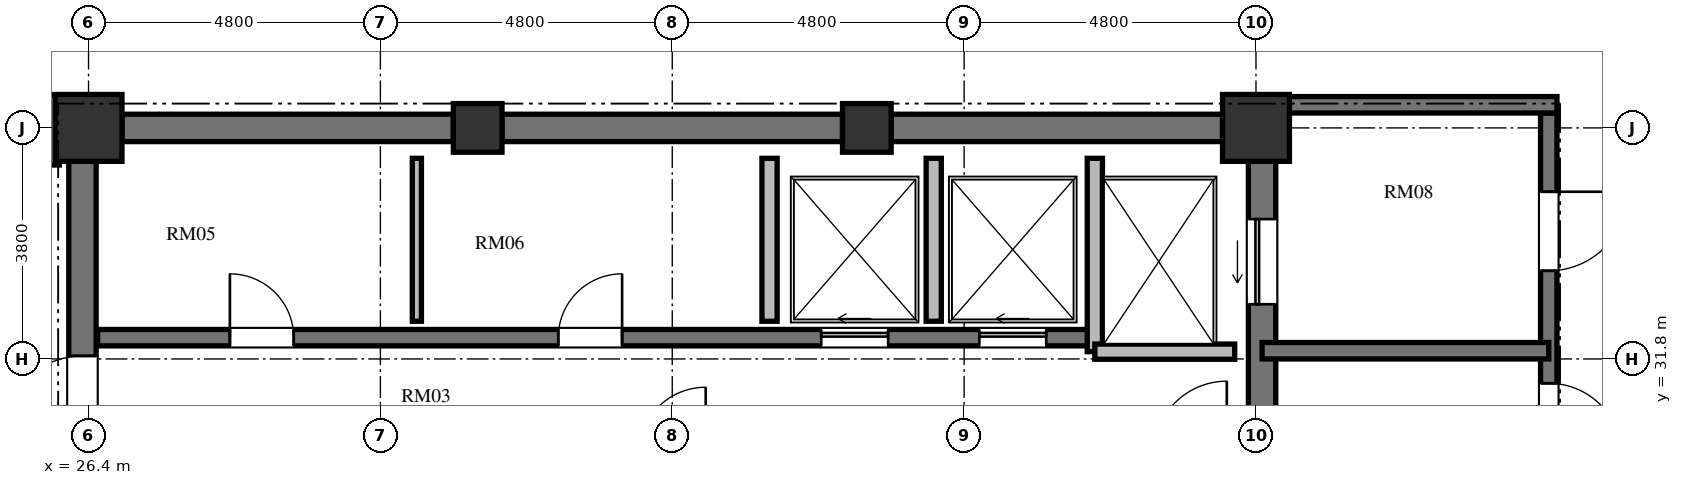
"""IFC4 building model, lengths in metres.
Left out: names, types, materials, properties, quantities, classifications, styles, units other than length and angle.
Written with IfcOpenShell. Run it as: python <this file> out.ifc"""

import sys

from ifc_helpers import new_model, si_unit, direction, frame, frame_2d, origin, origin_2d, place, context, subcontext, project, spatial, rectangle, extrude, element, fill, save


model = new_model("IFC4")
c1 = context("Model", 3, precision=1e-05, world=origin(), true_north=direction((0.0, 1.0)))
c2 = subcontext(c1, "Body", "Model", "MODEL_VIEW")
j1 = project(units=[si_unit("LENGTHUNIT", "METRE"), si_unit("PLANEANGLEUNIT", "RADIAN")], contexts=[c1])
p1 = place(None, origin())
s1 = spatial("IfcSite", under=j1, at=p1, CompositionType="ELEMENT")
p2 = place(p1, origin())
s2 = spatial("IfcBuilding", under=s1, at=p2, CompositionType="ELEMENT")
p3 = place(p2, frame((0.0, 0.0, 251.376)))
s3 = spatial("IfcBuildingStorey", under=s2, at=p3, CompositionType="ELEMENT", Elevation=251.376)
p4 = place(p3, frame((45.6, 35.6, 0.0), z_axis=(0.0, 0.0, 1.0), x_axis=(1.0, 0.0, 0.0)))
e1 = element("IfcColumn", 1, at=p4, inside=s3, PredefinedType="COLUMN", context=c2, shape_type="SweptSolid", body=[
    extrude(rectangle(XDim=1.1, YDim=1.1, at=origin_2d()), origin(), (0.0, 0.0, 1.0), 3.648),
])
for number, where, z_axis, x_axis in (
    (2, (39.2, 35.6, 0.0), (0.0, 0.0, 1.0), (1.0, 0.0, 0.0)),
    (3, (32.8, 35.6, 0.0), (0.0, 0.0, 1.0), (1.0, 0.0, 0.0)),
):
    element("IfcColumn", number, at=place(p3, frame(where, z_axis=z_axis, x_axis=x_axis)), inside=s3, PredefinedType="COLUMN", context=c2, shape_type="SweptSolid", body=[
        extrude(rectangle(XDim=0.8, YDim=0.8, at=origin_2d()), origin(), (0.0, 0.0, 1.0), 3.648),
    ])
p5 = place(p3, frame((26.4, 35.6, 0.0), z_axis=(0.0, 0.0, 1.0), x_axis=(1.0, 0.0, 0.0)))
e4 = element("IfcColumn", 4, at=p5, inside=s3, PredefinedType="COLUMN", context=c2, shape_type="SweptSolid", body=[
    extrude(rectangle(XDim=1.1, YDim=1.1, at=origin_2d()), origin(), (0.0, 0.0, 1.0), 3.648),
])
p6 = place(p3, frame((26.3, 20.95, 0.0), z_axis=(0.0, 0.0, 1.0), x_axis=(0.0, 1.0, 0.0)))
e5 = element("IfcWall", 5, at=p6, inside=s3, PredefinedType="SHEAR", context=c2, shape_type="SweptSolid", body=[
    extrude(rectangle(XDim=14.1, YDim=0.45, at=frame_2d((7.05, 0.0))), origin(), (0.0, 0.0, 1.0), 3.648),
])
p7 = place(p6, frame((6.5, 0.0, 0.0)))
e6 = element("IfcOpeningElement", 6, at=p7, cuts=e5, PredefinedType="OPENING", context=c2, shape_type="SweptSolid", body=[
    extrude(rectangle(XDim=1.2, YDim=2.15, at=frame_2d((0.6, 1.075))), frame((0.0, 0.235, 0.0), z_axis=(0.0, -1.0, 0.0), x_axis=(1.0, 0.0, 0.0)), (0.0, 0.0, 1.0), 0.47),
])
p8 = place(p6, frame((9.6, 0.0, 0.0)))
e7 = element("IfcOpeningElement", 7, at=p8, cuts=e5, PredefinedType="OPENING", context=c2, shape_type="SweptSolid", body=[
    extrude(rectangle(XDim=1.3, YDim=2.2, at=frame_2d((0.65, 1.1))), frame((0.0, 0.235, 0.0), z_axis=(0.0, -1.0, 0.0), x_axis=(1.0, 0.0, 0.0)), (0.0, 0.0, 1.0), 0.47),
])
p9 = place(p6, frame((3.26, 0.0, 0.0)))
e8 = element("IfcOpeningElement", 8, at=p9, cuts=e5, PredefinedType="OPENING", context=c2, shape_type="SweptSolid", body=[
    extrude(rectangle(XDim=1.3, YDim=2.2, at=frame_2d((0.65, 1.1))), frame((0.0, 0.235, 0.0), z_axis=(0.0, -1.0, 0.0), x_axis=(1.0, 0.0, 0.0)), (0.0, 0.0, 1.0), 0.47),
])
p10 = place(p3, frame((45.7, 20.95, 0.0), z_axis=(0.0, 0.0, 1.0), x_axis=(0.0, 1.0, 0.0)))
e9 = element("IfcWall", 9, at=p10, inside=s3, PredefinedType="SHEAR", context=c2, shape_type="SweptSolid", body=[
    extrude(rectangle(XDim=14.1, YDim=0.45, at=frame_2d((7.05, 0.0))), origin(), (0.0, 0.0, 1.0), 3.648),
])
p11 = place(p10, frame((11.75, 0.0, 0.0)))
e10 = element("IfcOpeningElement", 10, at=p11, cuts=e9, PredefinedType="OPENING", context=c2, shape_type="SweptSolid", body=[
    extrude(rectangle(XDim=1.4, YDim=2.3, at=frame_2d((0.7, 1.15))), frame((0.0, 0.235, 0.0), z_axis=(0.0, -1.0, 0.0), x_axis=(1.0, 0.0, 0.0)), (0.0, 0.0, 1.0), 0.47),
])
p12 = place(p10, frame((0.95, 0.0, 0.0)))
e11 = element("IfcOpeningElement", 11, at=p12, cuts=e9, PredefinedType="OPENING", context=c2, shape_type="SweptSolid", body=[
    extrude(rectangle(XDim=1.4, YDim=2.3, at=frame_2d((0.7, 1.15))), frame((0.0, 0.235, 0.0), z_axis=(0.0, -1.0, 0.0), x_axis=(1.0, 0.0, 0.0)), (0.0, 0.0, 1.0), 0.47),
])
p13 = place(p3, frame((26.95, 35.6, 0.0), z_axis=(0.0, 0.0, 1.0), x_axis=(1.0, 0.0, 0.0)))
e12 = element("IfcWall", 12, at=p13, inside=s3, PredefinedType="SHEAR", context=c2, shape_type="SweptSolid", body=[
    extrude(rectangle(XDim=5.45, YDim=0.45, at=frame_2d((2.725, 0.0))), origin(), (0.0, 0.0, 1.0), 3.648),
])
p14 = place(p3, frame((33.2, 35.6, 0.0), z_axis=(0.0, 0.0, 1.0), x_axis=(1.0, 0.0, 0.0)))
e13 = element("IfcWall", 13, at=p14, inside=s3, PredefinedType="SHEAR", context=c2, shape_type="SweptSolid", body=[
    extrude(rectangle(XDim=5.6, YDim=0.45, at=frame_2d((2.8, 0.0))), origin(), (0.0, 0.0, 1.0), 3.648),
])
p15 = place(p3, frame((39.6, 35.6, 0.0), z_axis=(0.0, 0.0, 1.0), x_axis=(1.0, 0.0, 0.0)))
e14 = element("IfcWall", 14, at=p15, inside=s3, PredefinedType="SHEAR", context=c2, shape_type="SweptSolid", body=[
    extrude(rectangle(XDim=5.45, YDim=0.45, at=frame_2d((2.725, 0.0))), origin(), (0.0, 0.0, 1.0), 3.648),
])
p16 = place(p3, frame((26.55, 32.15, 0.0), z_axis=(0.0, 0.0, 1.0), x_axis=(1.0, 0.0, 0.0)))
e15 = element("IfcWall", 15, at=p16, inside=s3, PredefinedType="SHEAR", context=c2, shape_type="SweptSolid", body=[
    extrude(rectangle(XDim=16.4, YDim=0.27, at=frame_2d((8.2, 0.0))), origin(), (0.0, 0.0, 1.0), 3.648),
])
p17 = place(p16, frame((2.175, 0.0, 0.0)))
e16 = element("IfcOpeningElement", 16, at=p17, cuts=e15, PredefinedType="OPENING", context=c2, shape_type="SweptSolid", body=[
    extrude(rectangle(XDim=1.05, YDim=2.15, at=frame_2d((0.525, 1.075))), frame((0.0, 0.145, 0.0), z_axis=(0.0, -1.0, 0.0), x_axis=(1.0, 0.0, 0.0)), (0.0, 0.0, 1.0), 0.29),
])
p18 = place(p16, frame((7.575, 0.0, 0.0)))
e17 = element("IfcOpeningElement", 17, at=p18, cuts=e15, PredefinedType="OPENING", context=c2, shape_type="SweptSolid", body=[
    extrude(rectangle(XDim=1.05, YDim=2.15, at=frame_2d((0.525, 1.075))), frame((0.0, 0.145, 0.0), z_axis=(0.0, -1.0, 0.0), x_axis=(1.0, 0.0, 0.0)), (0.0, 0.0, 1.0), 0.29),
])
p19 = place(p16, frame((11.9, 0.0, 0.0)))
e18 = element("IfcOpeningElement", 18, at=p19, cuts=e15, PredefinedType="OPENING", context=c2, shape_type="SweptSolid", body=[
    extrude(rectangle(XDim=1.1, YDim=2.2, at=frame_2d((0.55, 1.1))), frame((0.0, 0.145, 0.0), z_axis=(0.0, -1.0, 0.0), x_axis=(1.0, 0.0, 0.0)), (0.0, 0.0, 1.0), 0.29),
])
p20 = place(p16, frame((14.5, 0.0, 0.0)))
e19 = element("IfcOpeningElement", 19, at=p20, cuts=e15, PredefinedType="OPENING", context=c2, shape_type="SweptSolid", body=[
    extrude(rectangle(XDim=1.1, YDim=2.2, at=frame_2d((0.55, 1.1))), frame((0.0, 0.145, 0.0), z_axis=(0.0, -1.0, 0.0), x_axis=(1.0, 0.0, 0.0)), (0.0, 0.0, 1.0), 0.29),
])
p21 = place(p3, frame((42.95, 31.92, 0.0), z_axis=(0.0, 0.0, 1.0), x_axis=(0.0, 1.0, 0.0)))
e20 = element("IfcWall", 20, at=p21, inside=s3, PredefinedType="SOLIDWALL", context=c2, shape_type="SweptSolid", body=[
    extrude(rectangle(XDim=3.18, YDim=0.25, at=frame_2d((1.59, 0.0))), origin(), (0.0, 0.0, 1.0), 3.448),
])
p22 = place(p3, frame((42.95, 31.92, 0.0), z_axis=(0.0, 0.0, 1.0), x_axis=(1.0, 0.0, 0.0)))
e21 = element("IfcWall", 21, at=p22, inside=s3, PredefinedType="SOLIDWALL", context=c2, shape_type="SweptSolid", body=[
    extrude(rectangle(XDim=2.3, YDim=0.25, at=frame_2d((1.15, 0.0))), origin(), (0.0, 0.0, 1.0), 3.448),
])
for number, where, z_axis, x_axis in (
    (22, (37.6, 32.42, 0.0), (0.0, 0.0, 1.0), (0.0, 1.0, 0.0)),
    (23, (40.3, 32.42, 0.0), (0.0, 0.0, 1.0), (0.0, 1.0, 0.0)),
):
    element("IfcWall", number, at=place(p3, frame(where, z_axis=z_axis, x_axis=x_axis)), inside=s3, PredefinedType="SOLIDWALL", context=c2, shape_type="SweptSolid", body=[
        extrude(rectangle(XDim=2.68, YDim=0.25, at=frame_2d((1.34, 0.0))), origin(), (0.0, 0.0, 1.0), 3.448),
    ])
p23 = place(p3, frame((31.8, 32.42, 0.0), z_axis=(0.0, 0.0, 1.0), x_axis=(0.0, 1.0, 0.0)))
e24 = element("IfcWall", 24, at=p23, inside=s3, PredefinedType="PARTITIONING", context=c2, shape_type="SweptSolid", body=[
    extrude(rectangle(XDim=2.68, YDim=0.15, at=frame_2d((1.34, 0.0))), origin(), (0.0, 0.0, 1.0), 3.448),
])
p24 = place(p3, frame((50.415, 35.845, 0.0), z_axis=(0.0, 0.0, 1.0), x_axis=(0.0, -1.0, 0.0)))
e25 = element("IfcWall", 25, at=p24, inside=s3, PredefinedType="SHEAR", context=c2, shape_type="SweptSolid", body=[
    extrude(rectangle(XDim=15.825, YDim=0.27, at=frame_2d((7.913, 0.0))), origin(), (0.0, 0.0, 1.0), 3.648),
])
p25 = place(p24, frame((4.445, 0.0, 0.0)))
e26 = element("IfcOpeningElement", 26, at=p25, cuts=e25, PredefinedType="OPENING", context=c2, shape_type="SweptSolid", body=[
    extrude(rectangle(XDim=1.2, YDim=2.15, at=frame_2d((0.6, 1.075))), frame((0.0, 0.145, 0.0), z_axis=(0.0, -1.0, 0.0), x_axis=(1.0, 0.0, 0.0)), (0.0, 0.0, 1.0), 0.29),
])
p26 = place(p24, frame((1.295, 0.0, 0.0)))
e27 = element("IfcOpeningElement", 27, at=p26, cuts=e25, PredefinedType="OPENING", context=c2, shape_type="SweptSolid", body=[
    extrude(rectangle(XDim=1.3, YDim=2.2, at=frame_2d((0.65, 1.1))), frame((0.0, 0.145, 0.0), z_axis=(0.0, -1.0, 0.0), x_axis=(1.0, 0.0, 0.0)), (0.0, 0.0, 1.0), 0.29),
])
p27 = place(p24, frame((13.095, 0.0, 0.0)))
e28 = element("IfcOpeningElement", 28, at=p27, cuts=e25, PredefinedType="OPENING", context=c2, shape_type="SweptSolid", body=[
    extrude(rectangle(XDim=1.3, YDim=2.2, at=frame_2d((0.65, 1.1))), frame((0.0, 0.145, 0.0), z_axis=(0.0, -1.0, 0.0), x_axis=(1.0, 0.0, 0.0)), (0.0, 0.0, 1.0), 0.29),
])
p28 = place(p3, frame((45.925, 35.98, 0.0), z_axis=(0.0, 0.0, 1.0), x_axis=(1.0, 0.0, 0.0)))
e29 = element("IfcWall", 29, at=p28, inside=s3, PredefinedType="SHEAR", context=c2, shape_type="SweptSolid", body=[
    extrude(rectangle(XDim=4.625, YDim=0.27, at=frame_2d((2.312, 0.0))), origin(), (0.0, 0.0, 1.0), 3.648),
])
p29 = place(p3, frame((45.7, 31.935, 0.0), z_axis=(0.0, 0.0, 1.0), x_axis=(1.0, 0.0, 0.0)))
e30 = element("IfcWall", 30, at=p29, inside=s3, PredefinedType="SHEAR", context=c2, shape_type="SweptSolid", body=[
    extrude(rectangle(XDim=4.715, YDim=0.27, at=frame_2d((2.357, 0.0))), origin(), (0.0, 0.0, 1.0), 3.648),
])
p30 = place(p3, frame((23.294, 36.422, 0.0), z_axis=(0.0, 0.0, 1.0), x_axis=(0.945493277461, 0.325641616316, 0.0)))
e31 = element("IfcWall", 31, at=p30, inside=s3, PredefinedType="PARTITIONING", context=c2, shape_type="SweptSolid", body=[
    extrude(rectangle(XDim=5.562, YDim=0.18, at=frame_2d((2.781, 0.0))), origin(), (0.0, 0.0, 1.0), 3.073),
])
p31 = place(p3, frame((25.83, 36.14, 0.0), z_axis=(0.0, 0.0, 1.0), x_axis=(0.0, -1.0, 0.0)))
e32 = element("IfcWall", 32, at=p31, inside=s3, PredefinedType="PARTITIONING", context=c2, shape_type="SweptSolid", body=[
    extrude(rectangle(XDim=1.15, YDim=0.18, at=frame_2d((0.575, 0.0))), origin(), (0.0, 0.0, 1.0), 3.448),
])
p32 = place(p8, origin())
e33 = element("IfcDoor", 33, at=p32, inside=s3, OperationType="SINGLE_SWING_LEFT", PredefinedType="DOOR", context=c2, shape_type="SweptSolid", body=[
    extrude(rectangle(XDim=1.3, YDim=2.2, at=frame_2d((0.65, 1.1))), frame((0.0, 0.025, 0.0), z_axis=(0.0, -1.0, 0.0), x_axis=(1.0, 0.0, 0.0)), (0.0, 0.0, 1.0), 0.05),
])
fill(e7, e33)
p33 = place(p17, origin())
e34 = element("IfcDoor", 34, at=p33, inside=s3, OperationType="SINGLE_SWING_LEFT", PredefinedType="DOOR", context=c2, shape_type="SweptSolid", body=[
    extrude(rectangle(XDim=1.05, YDim=2.15, at=frame_2d((0.525, 1.075))), frame((0.0, 0.025, 0.0), z_axis=(0.0, -1.0, 0.0), x_axis=(1.0, 0.0, 0.0)), (0.0, 0.0, 1.0), 0.05),
])
fill(e16, e34)
p34 = place(p18, origin())
e35 = element("IfcDoor", 35, at=p34, inside=s3, OperationType="SINGLE_SWING_RIGHT", PredefinedType="DOOR", context=c2, shape_type="SweptSolid", body=[
    extrude(rectangle(XDim=1.05, YDim=2.15, at=frame_2d((0.525, 1.075))), frame((0.0, 0.025, 0.0), z_axis=(0.0, -1.0, 0.0), x_axis=(1.0, 0.0, 0.0)), (0.0, 0.0, 1.0), 0.05),
])
fill(e17, e35)
p35 = place(p19, origin())
e36 = element("IfcDoor", 36, at=p35, inside=s3, OperationType="SLIDING_TO_LEFT", PredefinedType="DOOR", context=c2, shape_type="SweptSolid", body=[
    extrude(rectangle(XDim=1.1, YDim=2.2, at=frame_2d((0.55, 1.1))), frame((0.0, 0.025, 0.0), z_axis=(0.0, -1.0, 0.0), x_axis=(1.0, 0.0, 0.0)), (0.0, 0.0, 1.0), 0.05),
])
fill(e18, e36)
p36 = place(p20, origin())
e37 = element("IfcDoor", 37, at=p36, inside=s3, OperationType="SLIDING_TO_LEFT", PredefinedType="DOOR", context=c2, shape_type="SweptSolid", body=[
    extrude(rectangle(XDim=1.1, YDim=2.2, at=frame_2d((0.55, 1.1))), frame((0.0, 0.025, 0.0), z_axis=(0.0, -1.0, 0.0), x_axis=(1.0, 0.0, 0.0)), (0.0, 0.0, 1.0), 0.05),
])
fill(e19, e37)
p37 = place(p11, origin())
e38 = element("IfcDoor", 38, at=p37, inside=s3, OperationType="SLIDING_TO_LEFT", PredefinedType="DOOR", context=c2, shape_type="SweptSolid", body=[
    extrude(rectangle(XDim=1.4, YDim=2.3, at=frame_2d((0.7, 1.15))), frame((0.0, 0.025, 0.0), z_axis=(0.0, -1.0, 0.0), x_axis=(1.0, 0.0, 0.0)), (0.0, 0.0, 1.0), 0.05),
])
fill(e10, e38)
p38 = place(p25, origin())
e39 = element("IfcDoor", 39, at=p38, inside=s3, OperationType="SINGLE_SWING_RIGHT", PredefinedType="DOOR", context=c2, shape_type="SweptSolid", body=[
    extrude(rectangle(XDim=1.2, YDim=2.15, at=frame_2d((0.6, 1.075))), frame((0.0, 0.025, 0.0), z_axis=(0.0, -1.0, 0.0), x_axis=(1.0, 0.0, 0.0)), (0.0, 0.0, 1.0), 0.05),
])
fill(e26, e39)
p39 = place(p26, origin())
e40 = element("IfcDoor", 40, at=p39, inside=s3, OperationType="SINGLE_SWING_LEFT", PredefinedType="DOOR", context=c2, shape_type="SweptSolid", body=[
    extrude(rectangle(XDim=1.3, YDim=2.2, at=frame_2d((0.65, 1.1))), frame((0.0, 0.025, 0.0), z_axis=(0.0, -1.0, 0.0), x_axis=(1.0, 0.0, 0.0)), (0.0, 0.0, 1.0), 0.05),
])
fill(e27, e40)
save(model, sys.argv[1])
